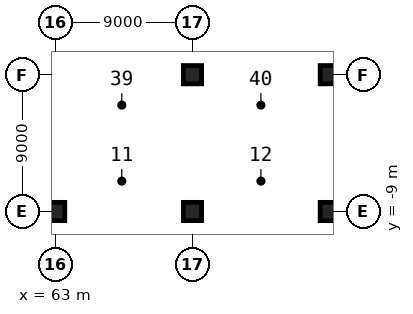
"""IFC4 building model, lengths in metres.
Left out: names, types, materials, properties, quantities, classifications, styles, units other than length and angle.
Written with IfcOpenShell. Run it as: python <this file> out.ifc"""

import sys

from ifc_helpers import new_model, si_unit, direction, frame, origin, origin_2d, place, context, subcontext, project, spatial, rectangle, extrude, element, save


model = new_model("IFC4")
c1 = context("Model", 3, precision=1e-05, world=origin(), true_north=direction((0.0, 1.0)))
c2 = subcontext(c1, "Body", "Model", "MODEL_VIEW")
j1 = project(units=[si_unit("LENGTHUNIT", "METRE"), si_unit("PLANEANGLEUNIT", "RADIAN")], contexts=[c1])
p1 = place(None, origin())
s1 = spatial("IfcSite", under=j1, at=p1, CompositionType="ELEMENT")
p2 = place(p1, origin())
s2 = spatial("IfcBuilding", under=s1, at=p2, CompositionType="ELEMENT")
p3 = place(p2, frame((0.0, 0.0, -9.0)))
s3 = spatial("IfcBuildingStorey", under=s2, at=p3, CompositionType="ELEMENT", Elevation=-9.0)
for number, where, z_axis, x_axis in (
    (1, (63.0, -9.0, 0.0), (0.0, 0.0, 1.0), (1.0, 0.0, 0.0)),
    (2, (72.0, -9.0, 0.0), (0.0, 0.0, 1.0), (1.0, 0.0, 0.0)),
    (3, (72.0, 0.0, 0.0), (0.0, 0.0, 1.0), (1.0, 0.0, 0.0)),
    (4, (81.0, -9.0, 0.0), (0.0, 0.0, 1.0), (1.0, 0.0, 0.0)),
    (5, (81.0, 0.0, 0.0), (0.0, 0.0, 1.0), (1.0, 0.0, 0.0)),
):
    element("IfcColumn", number, at=place(p3, frame(where, z_axis=z_axis, x_axis=x_axis)), inside=s3, PredefinedType="COLUMN", context=c2, shape_type="SweptSolid", body=[
        extrude(rectangle(XDim=1.2, YDim=1.2, at=origin_2d()), origin(), (0.0, 0.0, 1.0), 4.5),
    ])
save(model, sys.argv[1])
